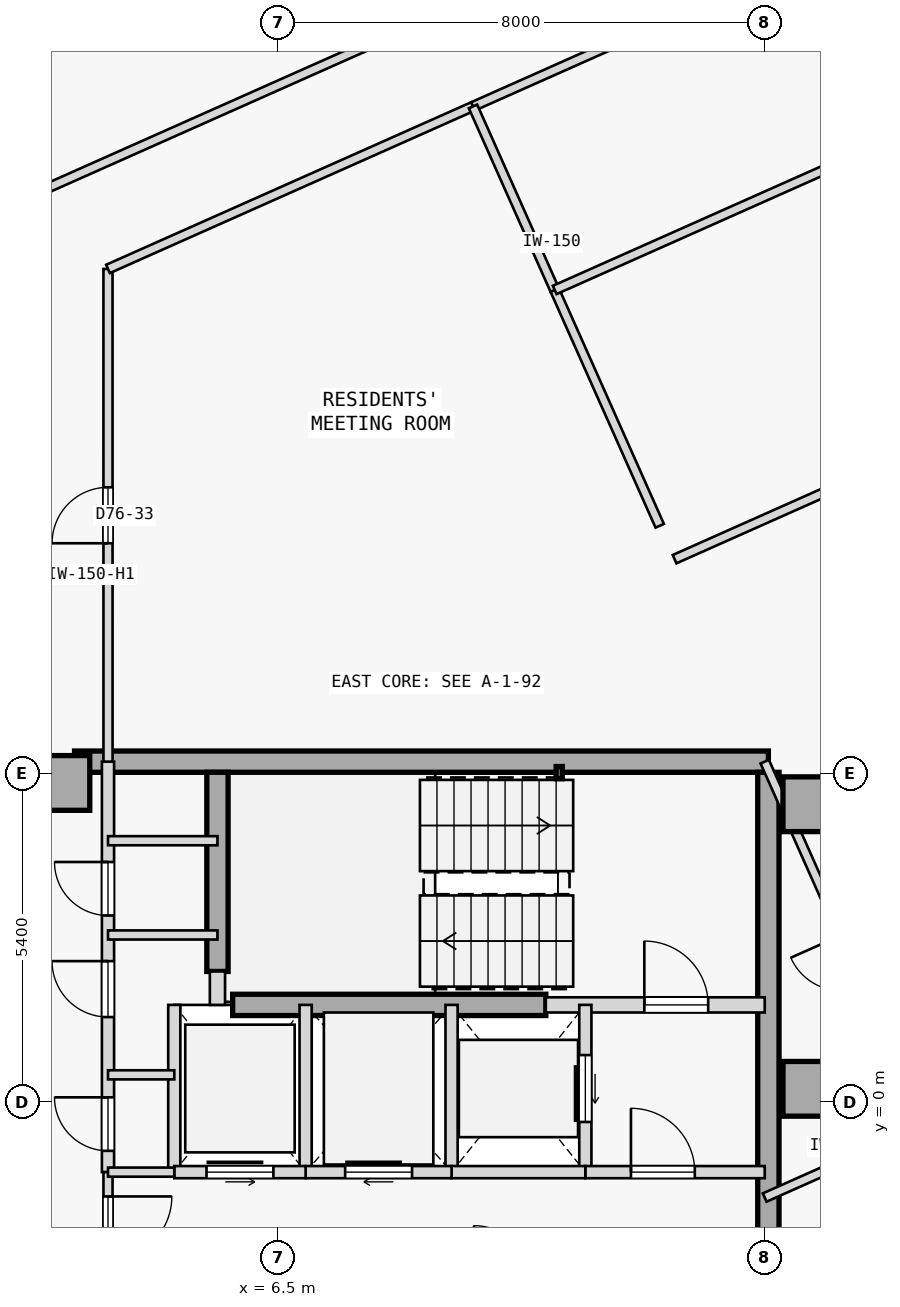
"""IFC4 building model, lengths in metres.
Left out: names, types, materials, properties, quantities, classifications, styles, units other than length and angle.
Written with IfcOpenShell. Run it as: python <this file> out.ifc"""

import sys

from ifc_helpers import new_model, si_unit, direction, frame, frame_2d, origin, origin_2d, place, context, subcontext, project, spatial, rectangle, hollow_rectangle, extrude, element, fill, save


model = new_model("IFC4")
c1 = context("Model", 3, precision=1e-05, world=origin(), true_north=direction((0.0, 1.0)))
c2 = subcontext(c1, "Body", "Model", "MODEL_VIEW")
j1 = project(units=[si_unit("LENGTHUNIT", "METRE"), si_unit("PLANEANGLEUNIT", "RADIAN")], contexts=[c1])
p1 = place(None, origin())
s1 = spatial("IfcSite", under=j1, at=p1, CompositionType="ELEMENT")
p2 = place(p1, origin())
s2 = spatial("IfcBuilding", under=s1, at=p2, CompositionType="ELEMENT")
p3 = place(p2, frame((0.0, 0.0, 285.25)))
s3 = spatial("IfcBuildingStorey", under=s2, at=p3, CompositionType="ELEMENT", Elevation=285.25)
for number, where, z_axis, x_axis in (
    (1, (15.25, 4.9, 0.0), (0.0, 0.0, 1.0), (1.0, 0.0, 0.0)),
    (2, (15.25, 0.22, 0.0), (0.0, 0.0, 1.0), (1.0, 0.0, 0.0)),
    (3, (2.95, 5.25, 0.0), (0.0, 0.0, 1.0), (1.0, 0.0, 0.0)),
):
    element("IfcColumn", number, at=place(p3, frame(where, z_axis=z_axis, x_axis=x_axis)), inside=s3, PredefinedType="COLUMN", context=c2, shape_type="SweptSolid", body=[
        extrude(rectangle(XDim=0.9, YDim=0.9, at=origin_2d()), origin(), (0.0, 0.0, 1.0), 3.35),
    ])
p4 = place(p3, frame((3.15, 5.6, 0.0), z_axis=(0.0, 0.0, 1.0), x_axis=(1.0, 0.0, 0.0)))
e4 = element("IfcWall", 4, at=p4, inside=s3, PredefinedType="SHEAR", context=c2, shape_type="SweptSolid", body=[
    extrude(rectangle(XDim=11.41, YDim=0.35, at=frame_2d((5.705, 0.0))), origin(), (0.0, 0.0, 1.0), 3.125),
])
p5 = place(p3, frame((14.56, -5.425, 0.0), z_axis=(0.0, 0.0, 1.0), x_axis=(0.0, 1.0, 0.0)))
e5 = element("IfcWall", 5, at=p5, inside=s3, PredefinedType="SHEAR", context=c2, shape_type="SweptSolid", body=[
    extrude(rectangle(XDim=10.85, YDim=0.35, at=frame_2d((5.425, 0.0))), origin(), (0.0, 0.0, 1.0), 3.125),
])
p6 = place(p3, frame((5.5, 2.15, 0.0), z_axis=(0.0, 0.0, 1.0), x_axis=(0.0, 1.0, 0.0)))
e6 = element("IfcWall", 6, at=p6, inside=s3, PredefinedType="SHEAR", context=c2, shape_type="SweptSolid", body=[
    extrude(rectangle(XDim=3.275, YDim=0.35, at=frame_2d((1.638, 0.0))), origin(), (0.0, 0.0, 1.0), 3.125),
])
p7 = place(p3, frame((5.75, 1.6, 0.0), z_axis=(0.0, 0.0, 1.0), x_axis=(1.0, 0.0, 0.0)))
e7 = element("IfcWall", 7, at=p7, inside=s3, PredefinedType="SHEAR", context=c2, shape_type="SweptSolid", body=[
    extrude(rectangle(XDim=5.15, YDim=0.35, at=frame_2d((2.575, 0.0))), origin(), (0.0, 0.0, 1.0), 3.125),
])
p8 = place(p3, frame((11.12, 5.42, 0.0), z_axis=(0.0, 0.0, 1.0), x_axis=(1.0, 0.0, 0.0)))
e8 = element("IfcColumn", 8, at=p8, inside=s3, PredefinedType="COLUMN", context=c2, shape_type="SweptSolid", body=[
    extrude(hollow_rectangle(XDim=0.1, YDim=0.2, WallThickness=0.008, at=origin_2d()), origin(), (0.0, 0.0, 1.0), 3.35),
])
p9 = place(p3, frame((10.9, 1.6, 0.0), z_axis=(0.0, 0.0, 1.0), x_axis=(1.0, 0.0, 0.0)))
e9 = element("IfcWall", 9, at=p9, inside=s3, PredefinedType="STANDARD", context=c2, shape_type="SweptSolid", body=[
    extrude(rectangle(XDim=3.6, YDim=0.25, at=frame_2d((1.8, 0.0))), origin(), (0.0, 0.0, 1.0), 3.125),
])
p10 = place(p9, frame((1.62, 0.0, 0.0)))
e10 = element("IfcOpeningElement", 10, at=p10, cuts=e9, PredefinedType="OPENING", context=c2, shape_type="SweptSolid", body=[
    extrude(rectangle(XDim=1.05, YDim=2.15, at=frame_2d((0.525, 1.075))), frame((0.0, 0.135, 0.0), z_axis=(0.0, -1.0, 0.0), x_axis=(1.0, 0.0, 0.0)), (0.0, 0.0, 1.0), 0.27),
])
p11 = place(p3, frame((5.5, 1.6, 0.0), z_axis=(0.0, 0.0, 1.0), x_axis=(0.0, 1.0, 0.0)))
e11 = element("IfcWall", 11, at=p11, inside=s3, PredefinedType="STANDARD", context=c2, shape_type="SweptSolid", body=[
    extrude(rectangle(XDim=0.55, YDim=0.25, at=frame_2d((0.275, 0.0))), origin(), (0.0, 0.0, 1.0), 3.125),
])
p12 = place(p3, frame((3.7, -1.15, 0.0), z_axis=(0.0, 0.0, 1.0), x_axis=(0.0, 1.0, 0.0)))
e12 = element("IfcWall", 12, at=p12, inside=s3, PredefinedType="STANDARD", context=c2, shape_type="SweptSolid", body=[
    extrude(rectangle(XDim=6.75, YDim=0.2, at=frame_2d((3.375, 0.0))), origin(), (0.0, 0.0, 1.0), 3.125),
])
p13 = place(p12, frame((0.35, 0.0, 0.0)))
e13 = element("IfcOpeningElement", 13, at=p13, cuts=e12, PredefinedType="OPENING", context=c2, shape_type="SweptSolid", body=[
    extrude(rectangle(XDim=0.88, YDim=2.15, at=frame_2d((0.44, 1.075))), frame((0.0, 0.11, 0.0), z_axis=(0.0, -1.0, 0.0), x_axis=(1.0, 0.0, 0.0)), (0.0, 0.0, 1.0), 0.22),
])
p14 = place(p12, frame((2.55, 0.0, 0.0)))
e14 = element("IfcOpeningElement", 14, at=p14, cuts=e12, PredefinedType="OPENING", context=c2, shape_type="SweptSolid", body=[
    extrude(rectangle(XDim=0.92, YDim=2.15, at=frame_2d((0.46, 1.075))), frame((0.0, 0.11, 0.0), z_axis=(0.0, -1.0, 0.0), x_axis=(1.0, 0.0, 0.0)), (0.0, 0.0, 1.0), 0.22),
])
p15 = place(p12, frame((4.22, 0.0, 0.0)))
e15 = element("IfcOpeningElement", 15, at=p15, cuts=e12, PredefinedType="OPENING", context=c2, shape_type="SweptSolid", body=[
    extrude(rectangle(XDim=0.88, YDim=2.15, at=frame_2d((0.44, 1.075))), frame((0.0, 0.11, 0.0), z_axis=(0.0, -1.0, 0.0), x_axis=(1.0, 0.0, 0.0)), (0.0, 0.0, 1.0), 0.22),
])
p16 = place(p3, frame((3.7, -2.95, 0.0), z_axis=(0.0, 0.0, 1.0), x_axis=(0.0, 1.0, 0.0)))
e16 = element("IfcWall", 16, at=p16, inside=s3, PredefinedType="PARTITIONING", context=c2, shape_type="SweptSolid", body=[
    extrude(rectangle(XDim=1.8, YDim=0.15, at=frame_2d((0.9, 0.0))), origin(), (0.0, 0.0, 1.0), 3.125),
])
p17 = place(p16, frame((0.35, 0.0, 0.0)))
e17 = element("IfcOpeningElement", 17, at=p17, cuts=e16, PredefinedType="OPENING", context=c2, shape_type="SweptSolid", body=[
    extrude(rectangle(XDim=1.05, YDim=2.18, at=frame_2d((0.525, 1.09))), frame((0.0, 0.085, 0.0), z_axis=(0.0, -1.0, 0.0), x_axis=(1.0, 0.0, 0.0)), (0.0, 0.0, 1.0), 0.17),
])
p18 = place(p3, frame((11.55, -1.15, 0.0), z_axis=(0.0, 0.0, 1.0), x_axis=(0.0, 1.0, 0.0)))
e18 = element("IfcWall", 18, at=p18, inside=s3, PredefinedType="STANDARD", context=c2, shape_type="SweptSolid", body=[
    extrude(rectangle(XDim=2.75, YDim=0.2, at=frame_2d((1.375, 0.0))), origin(), (0.0, 0.0, 1.0), 3.125),
])
p19 = place(p18, frame((0.825, 0.0, 0.0)))
e19 = element("IfcOpeningElement", 19, at=p19, cuts=e18, PredefinedType="OPENING", context=c2, shape_type="SweptSolid", body=[
    extrude(rectangle(XDim=1.1, YDim=2.15, at=frame_2d((0.55, 1.075))), frame((0.0, 0.11, 0.0), z_axis=(0.0, -1.0, 0.0), x_axis=(1.0, 0.0, 0.0)), (0.0, 0.0, 1.0), 0.22),
])
p20 = place(p3, frame((9.35, -1.15, 0.0), z_axis=(0.0, 0.0, 1.0), x_axis=(0.0, 1.0, 0.0)))
e20 = element("IfcWall", 20, at=p20, inside=s3, PredefinedType="STANDARD", context=c2, shape_type="SweptSolid", body=[
    extrude(rectangle(XDim=2.75, YDim=0.2, at=frame_2d((1.375, 0.0))), origin(), (0.0, 0.0, 1.0), 3.125),
])
p21 = place(p3, frame((11.55, -1.15, 0.0), z_axis=(0.0, 0.0, 1.0), x_axis=(1.0, 0.0, 0.0)))
e21 = element("IfcWall", 21, at=p21, inside=s3, PredefinedType="STANDARD", context=c2, shape_type="SweptSolid", body=[
    extrude(rectangle(XDim=2.95, YDim=0.2, at=frame_2d((1.475, 0.0))), origin(), (0.0, 0.0, 1.0), 3.125),
])
p22 = place(p21, frame((0.75, 0.0, 0.0)))
e22 = element("IfcOpeningElement", 22, at=p22, cuts=e21, PredefinedType="OPENING", context=c2, shape_type="SweptSolid", body=[
    extrude(rectangle(XDim=1.05, YDim=2.18, at=frame_2d((0.525, 1.09))), frame((0.0, 0.11, 0.0), z_axis=(0.0, -1.0, 0.0), x_axis=(1.0, 0.0, 0.0)), (0.0, 0.0, 1.0), 0.22),
])
p23 = place(p3, frame((9.35, -1.15, 0.0), z_axis=(0.0, 0.0, 1.0), x_axis=(1.0, 0.0, 0.0)))
e23 = element("IfcWall", 23, at=p23, inside=s3, PredefinedType="STANDARD", context=c2, shape_type="SweptSolid", body=[
    extrude(rectangle(XDim=2.2, YDim=0.2, at=frame_2d((1.1, 0.0))), origin(), (0.0, 0.0, 1.0), 3.125),
])
p24 = place(p3, frame((6.95, -1.15, 0.0), z_axis=(0.0, 0.0, 1.0), x_axis=(0.0, 1.0, 0.0)))
e24 = element("IfcWall", 24, at=p24, inside=s3, PredefinedType="STANDARD", context=c2, shape_type="SweptSolid", body=[
    extrude(rectangle(XDim=2.75, YDim=0.2, at=frame_2d((1.375, 0.0))), origin(), (0.0, 0.0, 1.0), 3.125),
])
p25 = place(p3, frame((6.95, -1.15, 0.0), z_axis=(0.0, 0.0, 1.0), x_axis=(1.0, 0.0, 0.0)))
e25 = element("IfcWall", 25, at=p25, inside=s3, PredefinedType="STANDARD", context=c2, shape_type="SweptSolid", body=[
    extrude(rectangle(XDim=2.4, YDim=0.2, at=frame_2d((1.2, 0.0))), origin(), (0.0, 0.0, 1.0), 3.125),
])
p26 = place(p25, frame((0.65, 0.0, 0.0)))
e26 = element("IfcOpeningElement", 26, at=p26, cuts=e25, PredefinedType="OPENING", context=c2, shape_type="SweptSolid", body=[
    extrude(rectangle(XDim=1.1, YDim=2.15, at=frame_2d((0.55, 1.075))), frame((0.0, 0.11, 0.0), z_axis=(0.0, -1.0, 0.0), x_axis=(1.0, 0.0, 0.0)), (0.0, 0.0, 1.0), 0.22),
])
p27 = place(p3, frame((4.79, -1.15, 0.0), z_axis=(0.0, 0.0, 1.0), x_axis=(0.0, 1.0, 0.0)))
e27 = element("IfcWall", 27, at=p27, inside=s3, PredefinedType="STANDARD", context=c2, shape_type="SweptSolid", body=[
    extrude(rectangle(XDim=2.75, YDim=0.2, at=frame_2d((1.375, 0.0))), origin(), (0.0, 0.0, 1.0), 3.125),
])
p28 = place(p3, frame((4.79, -1.15, 0.0), z_axis=(0.0, 0.0, 1.0), x_axis=(1.0, 0.0, 0.0)))
e28 = element("IfcWall", 28, at=p28, inside=s3, PredefinedType="STANDARD", context=c2, shape_type="SweptSolid", body=[
    extrude(rectangle(XDim=2.16, YDim=0.2, at=frame_2d((1.08, 0.0))), origin(), (0.0, 0.0, 1.0), 3.125),
])
p29 = place(p28, frame((0.53, 0.0, 0.0)))
e29 = element("IfcOpeningElement", 29, at=p29, cuts=e28, PredefinedType="OPENING", context=c2, shape_type="SweptSolid", body=[
    extrude(rectangle(XDim=1.1, YDim=2.15, at=frame_2d((0.55, 1.075))), frame((0.0, 0.11, 0.0), z_axis=(0.0, -1.0, 0.0), x_axis=(1.0, 0.0, 0.0)), (0.0, 0.0, 1.0), 0.22),
])
p30 = place(p3, frame((3.7, -1.15, 0.0), z_axis=(0.0, 0.0, 1.0), x_axis=(1.0, 0.0, 0.0)))
e30 = element("IfcWall", 30, at=p30, inside=s3, PredefinedType="PARTITIONING", context=c2, shape_type="SweptSolid", body=[
    extrude(rectangle(XDim=1.09, YDim=0.15, at=frame_2d((0.545, 0.0))), origin(), (0.0, 0.0, 1.0), 3.125),
])
p31 = place(p3, frame((3.7, 4.3, 0.0), z_axis=(0.0, 0.0, 1.0), x_axis=(1.0, 0.0, 0.0)))
e31 = element("IfcWall", 31, at=p31, inside=s3, PredefinedType="PARTITIONING", context=c2, shape_type="SweptSolid", body=[
    extrude(rectangle(XDim=1.8, YDim=0.15, at=frame_2d((0.9, 0.0))), origin(), (0.0, 0.0, 1.0), 3.125),
])
p32 = place(p3, frame((3.7, 0.45, 0.0), z_axis=(0.0, 0.0, 1.0), x_axis=(1.0, 0.0, 0.0)))
e32 = element("IfcWall", 32, at=p32, inside=s3, PredefinedType="PARTITIONING", context=c2, shape_type="SweptSolid", body=[
    extrude(rectangle(XDim=1.09, YDim=0.15, at=frame_2d((0.545, 0.0))), origin(), (0.0, 0.0, 1.0), 3.125),
])
p33 = place(p3, frame((3.7, 2.75, 0.0), z_axis=(0.0, 0.0, 1.0), x_axis=(1.0, 0.0, 0.0)))
e33 = element("IfcWall", 33, at=p33, inside=s3, PredefinedType="PARTITIONING", context=c2, shape_type="SweptSolid", body=[
    extrude(rectangle(XDim=1.8, YDim=0.15, at=frame_2d((0.9, 0.0))), origin(), (0.0, 0.0, 1.0), 3.125),
])
p34 = place(p3, frame((3.7, 5.601, 0.0), z_axis=(0.0, 0.0, 1.0), x_axis=(-6.0264561e-05, 0.999999998184, 0.0)))
e34 = element("IfcWall", 34, at=p34, inside=s3, PredefinedType="PARTITIONING", context=c2, shape_type="SweptSolid", body=[
    extrude(rectangle(XDim=8.102, YDim=0.15, at=frame_2d((4.051, 0.0))), origin(), (0.0, 0.0, 1.0), 2.675),
])
p35 = place(p34, frame((3.591, 0.0, 0.0)))
e35 = element("IfcOpeningElement", 35, at=p35, cuts=e34, PredefinedType="OPENING", context=c2, shape_type="SweptSolid", body=[
    extrude(rectangle(XDim=0.92, YDim=2.15, at=frame_2d((0.46, 1.075))), frame((0.0, 0.085, 0.0), z_axis=(0.0, -1.0, 0.0), x_axis=(1.0, 0.0, 0.0)), (0.0, 0.0, 1.0), 0.17),
])
p36 = place(p3, frame((3.7, 13.703, 0.0), z_axis=(0.0, 0.0, 1.0), x_axis=(0.913549363376, 0.406727870542, 0.0)))
e36 = element("IfcWall", 36, at=p36, inside=s3, PredefinedType="PARTITIONING", context=c2, shape_type="SweptSolid", body=[
    extrude(rectangle(XDim=6.571, YDim=0.15, at=frame_2d((3.286, 0.0))), origin(), (0.0, 0.0, 1.0), 3.125),
])
p37 = place(p3, frame((-9.109, 9.773, 0.0), z_axis=(0.0, 0.0, 1.0), x_axis=(0.913545361298, 0.406736859469, 0.0)))
e37 = element("IfcWall", 37, at=p37, inside=s3, PredefinedType="PARTITIONING", context=c2, shape_type="SweptSolid", body=[
    extrude(rectangle(XDim=19.871, YDim=0.15, at=frame_2d((9.936, 0.0))), origin(), (0.0, 0.0, 1.0), 3.125),
])
p38 = place(p37, frame((9.476, 0.0, 0.0)))
e38 = element("IfcOpeningElement", 38, at=p38, cuts=e37, PredefinedType="OPENING", context=c2, shape_type="SweptSolid", body=[
    extrude(rectangle(XDim=0.92, YDim=2.15, at=frame_2d((0.46, 1.075))), frame((0.0, 0.085, 0.0), z_axis=(0.0, -1.0, 0.0), x_axis=(1.0, 0.0, 0.0)), (0.0, 0.0, 1.0), 0.17),
])
p39 = place(p3, frame((9.703, 16.375, 0.0), z_axis=(0.0, 0.0, 1.0), x_axis=(0.913544622417, 0.406738519018, 0.0)))
e39 = element("IfcWall", 39, at=p39, inside=s3, PredefinedType="PARTITIONING", context=c2, shape_type="SweptSolid", body=[
    extrude(rectangle(XDim=14.192, YDim=0.15, at=frame_2d((7.096, 0.0))), origin(), (0.0, 0.0, 1.0), 3.125),
])
p40 = place(p39, frame((6.636, 0.0, 0.0)))
e40 = element("IfcOpeningElement", 40, at=p40, cuts=e39, PredefinedType="OPENING", context=c2, shape_type="SweptSolid", body=[
    extrude(rectangle(XDim=0.92, YDim=2.15, at=frame_2d((0.46, 1.075))), frame((0.0, 0.085, 0.0), z_axis=(0.0, -1.0, 0.0), x_axis=(1.0, 0.0, 0.0)), (0.0, 0.0, 1.0), 0.17),
])
p41 = place(p3, frame((14.5, -1.568, 0.0), z_axis=(0.0, 0.0, 1.0), x_axis=(0.91354204122, 0.4067443164, 0.0)))
e41 = element("IfcWall", 41, at=p41, inside=s3, PredefinedType="PARTITIONING", context=c2, shape_type="SweptSolid", body=[
    extrude(rectangle(XDim=2.916, YDim=0.15, at=frame_2d((1.458, 0.0))), origin(), (0.0, 0.0, 1.0), 3.125),
])
p42 = place(p3, frame((15.616, 3.094, 0.0), z_axis=(0.0, 0.0, 1.0), x_axis=(-0.406782551453, 0.913525016534, 0.0)))
e42 = element("IfcWall", 42, at=p42, inside=s3, PredefinedType="PARTITIONING", context=c2, shape_type="SweptSolid", body=[
    extrude(rectangle(XDim=2.743, YDim=0.15, at=frame_2d((1.372, 0.0))), origin(), (0.0, 0.0, 1.0), 3.125),
])
p43 = place(p3, frame((12.773, 9.479, 0.0), z_axis=(0.0, 0.0, 1.0), x_axis=(-0.406762672331, 0.913533868227, 0.0)))
e43 = element("IfcWall", 43, at=p43, inside=s3, PredefinedType="PARTITIONING", context=c2, shape_type="SweptSolid", body=[
    extrude(rectangle(XDim=4.245, YDim=0.15, at=frame_2d((2.123, 0.0))), origin(), (0.0, 0.0, 1.0), 3.125),
])
p44 = place(p3, frame((11.046, 13.357, 0.0), z_axis=(0.0, 0.0, 1.0), x_axis=(-0.406714303965, 0.913555403328, 0.0)))
e44 = element("IfcWall", 44, at=p44, inside=s3, PredefinedType="PARTITIONING", context=c2, shape_type="SweptSolid", body=[
    extrude(rectangle(XDim=3.304, YDim=0.15, at=frame_2d((1.652, 0.0))), origin(), (0.0, 0.0, 1.0), 3.125),
])
p45 = place(p3, frame((13.018, 8.93, 0.0), z_axis=(0.0, 0.0, 1.0), x_axis=(0.913551014388, 0.406724162191, 0.0)))
e45 = element("IfcWall", 45, at=p45, inside=s3, PredefinedType="PARTITIONING", context=c2, shape_type="SweptSolid", body=[
    extrude(rectangle(XDim=14.192, YDim=0.15, at=frame_2d((7.096, 0.0))), origin(), (0.0, 0.0, 1.0), 3.125),
])
p46 = place(p45, frame((6.636, 0.0, 0.0)))
e46 = element("IfcOpeningElement", 46, at=p46, cuts=e45, PredefinedType="OPENING", context=c2, shape_type="SweptSolid", body=[
    extrude(rectangle(XDim=0.92, YDim=2.15, at=frame_2d((0.46, 1.075))), frame((0.0, 0.085, 0.0), z_axis=(0.0, -1.0, 0.0), x_axis=(1.0, 0.0, 0.0)), (0.0, 0.0, 1.0), 0.17),
])
p47 = place(p3, frame((11.046, 13.357, 0.0), z_axis=(0.0, 0.0, 1.0), x_axis=(0.913553860075, 0.406717770379, 0.0)))
e47 = element("IfcWall", 47, at=p47, inside=s3, PredefinedType="PARTITIONING", context=c2, shape_type="SweptSolid", body=[
    extrude(rectangle(XDim=14.192, YDim=0.15, at=frame_2d((7.096, 0.0))), origin(), (0.0, 0.0, 1.0), 3.125),
])
p48 = place(p10, origin())
e48 = element("IfcDoor", 48, at=p48, inside=s3, OperationType="SINGLE_SWING_LEFT", PredefinedType="DOOR", context=c2, shape_type="SweptSolid", body=[
    extrude(rectangle(XDim=1.05, YDim=2.15, at=frame_2d((0.525, 1.075))), frame((0.0, 0.025, 0.0), z_axis=(0.0, -1.0, 0.0), x_axis=(1.0, 0.0, 0.0)), (0.0, 0.0, 1.0), 0.05),
])
fill(e10, e48)
p49 = place(p22, origin())
e49 = element("IfcDoor", 49, at=p49, inside=s3, OperationType="SINGLE_SWING_LEFT", PredefinedType="DOOR", context=c2, shape_type="SweptSolid", body=[
    extrude(rectangle(XDim=1.05, YDim=2.18, at=frame_2d((0.525, 1.09))), frame((0.0, 0.025, 0.0), z_axis=(0.0, -1.0, 0.0), x_axis=(1.0, 0.0, 0.0)), (0.0, 0.0, 1.0), 0.05),
])
fill(e22, e49)
p50 = place(p17, frame((1.05, 0.0, 0.0), z_axis=(0.0, 0.0, 1.0), x_axis=(-1.0, 0.0, 0.0)))
e50 = element("IfcDoor", 50, at=p50, inside=s3, OperationType="SINGLE_SWING_RIGHT", PredefinedType="DOOR", context=c2, shape_type="SweptSolid", body=[
    extrude(rectangle(XDim=1.05, YDim=2.18, at=frame_2d((0.525, 1.09))), frame((0.0, 0.025, 0.0), z_axis=(0.0, -1.0, 0.0), x_axis=(1.0, 0.0, 0.0)), (0.0, 0.0, 1.0), 0.05),
])
fill(e17, e50)
p51 = place(p19, origin())
e51 = element("IfcDoor", 51, at=p51, inside=s3, OperationType="SLIDING_TO_RIGHT", PredefinedType="DOOR", context=c2, shape_type="SweptSolid", body=[
    extrude(rectangle(XDim=1.1, YDim=2.15, at=frame_2d((0.55, 1.075))), frame((0.0, 0.025, 0.0), z_axis=(0.0, -1.0, 0.0), x_axis=(1.0, 0.0, 0.0)), (0.0, 0.0, 1.0), 0.05),
])
fill(e19, e51)
p52 = place(p26, origin())
e52 = element("IfcDoor", 52, at=p52, inside=s3, OperationType="SLIDING_TO_RIGHT", PredefinedType="DOOR", context=c2, shape_type="SweptSolid", body=[
    extrude(rectangle(XDim=1.1, YDim=2.15, at=frame_2d((0.55, 1.075))), frame((0.0, 0.025, 0.0), z_axis=(0.0, -1.0, 0.0), x_axis=(1.0, 0.0, 0.0)), (0.0, 0.0, 1.0), 0.05),
])
fill(e26, e52)
p53 = place(p29, origin())
e53 = element("IfcDoor", 53, at=p53, inside=s3, OperationType="SLIDING_TO_LEFT", PredefinedType="DOOR", context=c2, shape_type="SweptSolid", body=[
    extrude(rectangle(XDim=1.1, YDim=2.15, at=frame_2d((0.55, 1.075))), frame((0.0, 0.025, 0.0), z_axis=(0.0, -1.0, 0.0), x_axis=(1.0, 0.0, 0.0)), (0.0, 0.0, 1.0), 0.05),
])
fill(e29, e53)
p54 = place(p13, origin())
e54 = element("IfcDoor", 54, at=p54, inside=s3, OperationType="SINGLE_SWING_RIGHT", PredefinedType="DOOR", context=c2, shape_type="SweptSolid", body=[
    extrude(rectangle(XDim=0.88, YDim=2.15, at=frame_2d((0.44, 1.075))), frame((0.0, 0.025, 0.0), z_axis=(0.0, -1.0, 0.0), x_axis=(1.0, 0.0, 0.0)), (0.0, 0.0, 1.0), 0.05),
])
fill(e13, e54)
p55 = place(p14, origin())
e55 = element("IfcDoor", 55, at=p55, inside=s3, OperationType="SINGLE_SWING_RIGHT", PredefinedType="DOOR", context=c2, shape_type="SweptSolid", body=[
    extrude(rectangle(XDim=0.92, YDim=2.15, at=frame_2d((0.46, 1.075))), frame((0.0, 0.025, 0.0), z_axis=(0.0, -1.0, 0.0), x_axis=(1.0, 0.0, 0.0)), (0.0, 0.0, 1.0), 0.05),
])
fill(e14, e55)
p56 = place(p15, origin())
e56 = element("IfcDoor", 56, at=p56, inside=s3, OperationType="SINGLE_SWING_RIGHT", PredefinedType="DOOR", context=c2, shape_type="SweptSolid", body=[
    extrude(rectangle(XDim=0.88, YDim=2.15, at=frame_2d((0.44, 1.075))), frame((0.0, 0.025, 0.0), z_axis=(0.0, -1.0, 0.0), x_axis=(1.0, 0.0, 0.0)), (0.0, 0.0, 1.0), 0.05),
])
fill(e15, e56)
p57 = place(p35, origin())
e57 = element("IfcDoor", 57, at=p57, inside=s3, OperationType="SINGLE_SWING_LEFT", PredefinedType="DOOR", context=c2, shape_type="SweptSolid", body=[
    extrude(rectangle(XDim=0.92, YDim=2.15, at=frame_2d((0.46, 1.075))), frame((0.0, 0.025, 0.0), z_axis=(0.0, -1.0, 0.0), x_axis=(1.0, 0.0, 0.0)), (0.0, 0.0, 1.0), 0.05),
])
fill(e35, e57)
save(model, sys.argv[1])
